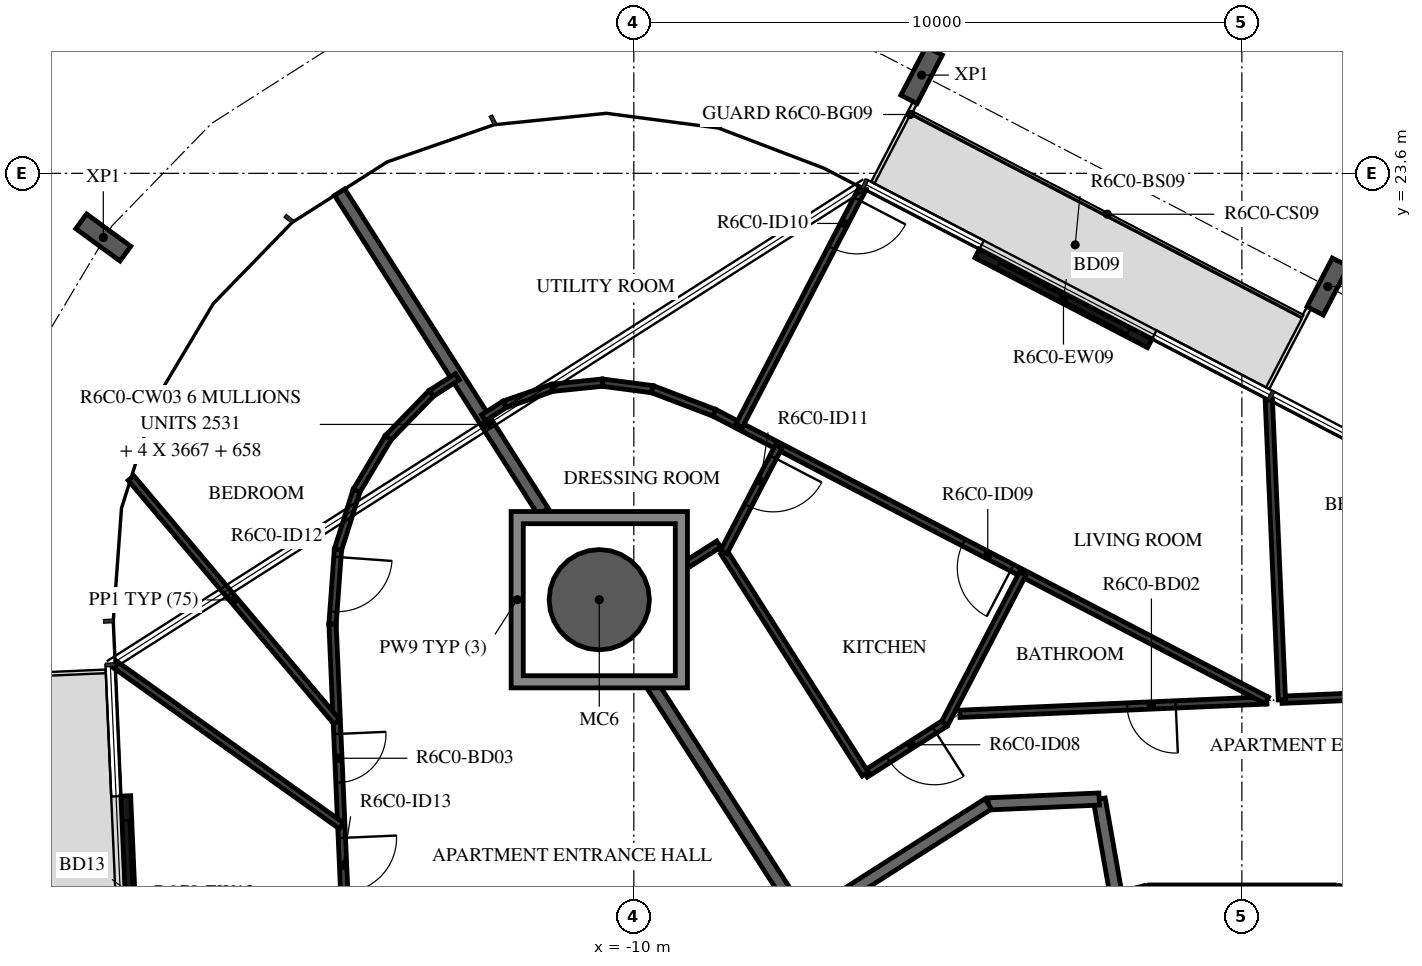
"""IFC4 building model, lengths in metres.
Left out: names, types, materials, properties, quantities, classifications, styles, units other than length and angle.
Written with IfcOpenShell. Run it as: python <this file> out.ifc"""

import sys

from ifc_helpers import new_model, si_unit, direction, frame, frame_2d, origin, origin_2d, place, context, subcontext, project, spatial, polyline, rectangle, hollow_circle, i_section, outline, extrude, element, fill, save


model = new_model("IFC4")
c1 = context("Model", 3, precision=1e-05, world=origin(), true_north=direction((0.0, 1.0)))
c2 = subcontext(c1, "Body", "Model", "MODEL_VIEW")
j1 = project(units=[si_unit("LENGTHUNIT", "METRE"), si_unit("PLANEANGLEUNIT", "RADIAN")], contexts=[c1])
p1 = place(None, origin())
s1 = spatial("IfcSite", under=j1, at=p1, CompositionType="ELEMENT")
p2 = place(p1, origin())
s2 = spatial("IfcBuilding", under=s1, at=p2, CompositionType="ELEMENT")
p3 = place(p2, frame((0.0, 0.0, 247.7)))
s3 = spatial("IfcBuildingStorey", under=s2, at=p3, CompositionType="ELEMENT", Elevation=247.7)
p4 = place(p3, frame((-10.568, 16.588, -0.38), z_axis=(0.0, 0.0, 1.0), x_axis=(1.0, 0.0, 0.0)))
e1 = element("IfcColumn", 1, at=p4, inside=s3, PredefinedType="COLUMN", context=c2, shape_type="SweptSolid", body=[
    extrude(hollow_circle(Radius=0.825, WallThickness=0.04, at=origin_2d()), origin(), (0.0, 0.0, 1.0), 3.5),
])
for number, where, z_axis, x_axis in (
    (2, (1.412, 21.739, -0.38), (0.0, 0.0, 1.0), (0.887, -0.462, 0.0)),
    (3, (-5.267, 25.216, -0.38), (0.0, 0.0, 1.0), (0.887, -0.462, 0.0)),
    (4, (-18.724, 22.545, -0.38), (0.0, 0.0, 1.0), (0.59, 0.808, 0.0)),
):
    element("IfcColumn", number, at=place(p3, frame(where, z_axis=z_axis, x_axis=x_axis)), inside=s3, PredefinedType="COLUMN", context=c2, shape_type="SweptSolid", body=[
        extrude(i_section(OverallWidth=0.3, OverallDepth=0.9, WebThickness=0.019, FlangeThickness=0.035, FilletRadius=0.03, at=origin_2d()), origin(), (0.0, 0.0, 1.0), 3.5),
    ])
p5 = place(p3, frame((-1.515, 20.804, 0.0), z_axis=(0.0, 0.0, 1.0), x_axis=(-0.887014349583, 0.461741858221, 0.0)))
e5 = element("IfcWall", 5, at=p5, inside=s3, PredefinedType="STANDARD", context=c2, shape_type="SweptSolid", body=[
    extrude(rectangle(XDim=3.2, YDim=0.16, at=frame_2d((1.6, 0.0))), origin(), (0.0, 0.0, 1.0), 3.12),
])
p6 = place(p5, frame((0.4, 0.0, 0.0)))
e6 = element("IfcOpeningElement", 6, at=p6, cuts=e5, PredefinedType="OPENING", context=c2, shape_type="SweptSolid", body=[
    extrude(rectangle(XDim=2.4, YDim=2.4, at=frame_2d((1.2, 1.2))), frame((0.0, 0.09, 0.0), z_axis=(0.0, -1.0, 0.0), x_axis=(1.0, 0.0, 0.0)), (0.0, 0.0, 1.0), 0.18),
])
p7 = place(p3, frame((-18.355, 13.362, 0.0), z_axis=(0.0, 0.0, 1.0), x_axis=(0.043639181999, -0.999047357133, 0.0)))
e7 = element("IfcWall", 7, at=p7, inside=s3, PredefinedType="STANDARD", context=c2, shape_type="SweptSolid", body=[
    extrude(rectangle(XDim=3.2, YDim=0.16, at=frame_2d((1.6, 0.0))), origin(), (0.0, 0.0, 1.0), 3.12),
])
p8 = place(p7, frame((0.4, 0.0, 0.0)))
e8 = element("IfcOpeningElement", 8, at=p8, cuts=e7, PredefinedType="OPENING", context=c2, shape_type="SweptSolid", body=[
    extrude(rectangle(XDim=2.4, YDim=2.4, at=frame_2d((1.2, 1.2))), frame((0.0, 0.09, 0.0), z_axis=(0.0, -1.0, 0.0), x_axis=(1.0, 0.0, 0.0)), (0.0, 0.0, 1.0), 0.18),
])
p9 = place(p3, frame((4.479, 10.858, 0.0), z_axis=(0.0, 0.0, 1.0), x_axis=(-0.965948410781, 0.258734743916, 0.0)))
e9 = element("IfcWall", 9, at=p9, inside=s3, PredefinedType="SHEAR", context=c2, shape_type="SweptSolid", body=[
    extrude(rectangle(XDim=3.033, YDim=0.5, at=frame_2d((1.516, 0.0))), origin(), (0.0, 0.0, 1.0), 3.12),
])
p10 = place(p9, frame((1.066, 0.0, 0.0)))
e10 = element("IfcOpeningElement", 10, at=p10, cuts=e9, PredefinedType="OPENING", context=c2, shape_type="SweptSolid", body=[
    extrude(rectangle(XDim=0.9, YDim=2.1, at=frame_2d((0.45, 1.05))), frame((0.0, 0.26, 0.0), z_axis=(0.0, -1.0, 0.0), x_axis=(1.0, 0.0, 0.0)), (0.0, 0.0, 1.0), 0.52),
])
for number, where, z_axis, x_axis in (
    (11, (1.516, 11.647, 0.0), (0.0, 0.0, 1.0), (-1.0, 0.0, 0.0)),
    (12, (-1.55, 11.643, 0.0), (0.0, 0.0, 1.0), (-0.966, -0.259, 0.0)),
):
    element("IfcWall", number, at=place(p3, frame(where, z_axis=z_axis, x_axis=x_axis)), inside=s3, PredefinedType="SHEAR", context=c2, shape_type="SweptSolid", body=[
        extrude(rectangle(XDim=3.033, YDim=0.5, at=frame_2d((1.516, 0.0))), origin(), (0.0, 0.0, 1.0), 3.12),
    ])
p11 = place(p3, frame((-2.074, 11.761, 0.0), z_axis=(0.0, 0.0, 1.0), x_axis=(-0.173679082312, 0.984802303189, 0.0)))
e13 = element("IfcWall", 13, at=p11, inside=s3, PredefinedType="STANDARD", context=c2, shape_type="SweptSolid", body=[
    extrude(rectangle(XDim=1.573, YDim=0.2, at=frame_2d((0.787, 0.0))), origin(), (0.0, 0.0, 1.0), 3.12),
])
p12 = place(p3, frame((-2.347, 13.31, 0.0), z_axis=(0.0, 0.0, 1.0), x_axis=(-0.999050095671, -0.043576442492, 0.0)))
e14 = element("IfcWall", 14, at=p12, inside=s3, PredefinedType="STANDARD", context=c2, shape_type="SweptSolid", body=[
    extrude(rectangle(XDim=1.826, YDim=0.2, at=frame_2d((0.913, 0.0))), origin(), (0.0, 0.0, 1.0), 3.12),
])
p13 = place(p3, frame((-4.172, 13.231, 0.0), z_axis=(0.0, 0.0, 1.0), x_axis=(-0.843388394728, -0.537304397561, 0.0)))
e15 = element("IfcWall", 15, at=p13, inside=s3, PredefinedType="STANDARD", context=c2, shape_type="SweptSolid", body=[
    extrude(rectangle(XDim=7.181, YDim=0.2, at=frame_2d((3.59, 0.0))), origin(), (0.0, 0.0, 1.0), 3.12),
])
p14 = place(p3, frame((-9.69, 15.171, 0.0), z_axis=(0.0, 0.0, 1.0), x_axis=(0.540961372678, -0.841047438181, 0.0)))
e16 = element("IfcWall", 16, at=p14, inside=s3, PredefinedType="STANDARD", context=c2, shape_type="SweptSolid", body=[
    extrude(rectangle(XDim=4.602, YDim=0.2, at=frame_2d((2.301, 0.0))), origin(), (0.0, 0.0, 1.0), 3.12),
])
p15 = place(p3, frame((-14.837, 23.29, 0.0), z_axis=(0.0, 0.0, 1.0), x_axis=(0.537316863221, -0.843380452998, 0.0)))
e17 = element("IfcWall", 17, at=p15, inside=s3, PredefinedType="STANDARD", context=c2, shape_type="SweptSolid", body=[
    extrude(rectangle(XDim=6.227, YDim=0.2, at=frame_2d((3.113, 0.0))), origin(), (0.0, 0.0, 1.0), 3.12),
])
p16 = place(p3, frame((3.339, 15.06, 0.0), z_axis=(0.0, 0.0, 1.0), x_axis=(-0.999045829762, -0.043674134634, 0.0)))
e18 = element("IfcWall", 18, at=p16, inside=s3, PredefinedType="PARTITIONING", context=c2, shape_type="SweptSolid", body=[
    extrude(rectangle(XDim=2.683, YDim=0.12, at=frame_2d((1.342, 0.0))), origin(), (0.0, 0.0, 1.0), 3.12),
])
p17 = place(p3, frame((0.41, 14.932, 0.0), z_axis=(0.0, 0.0, 1.0), x_axis=(-0.99904802852, -0.043623808982, 0.0)))
e19 = element("IfcWall", 19, at=p17, inside=s3, PredefinedType="PARTITIONING", context=c2, shape_type="SweptSolid", body=[
    extrude(rectangle(XDim=5.054, YDim=0.12, at=frame_2d((2.527, 0.0))), origin(), (0.0, 0.0, 1.0), 3.12),
])
p18 = place(p17, frame((1.5, 0.0, 0.0)))
e20 = element("IfcOpeningElement", 20, at=p18, cuts=e19, PredefinedType="OPENING", context=c2, shape_type="SweptSolid", body=[
    extrude(rectangle(XDim=0.8, YDim=2.1, at=frame_2d((0.4, 1.05))), frame((0.0, 0.07, 0.0), z_axis=(0.0, -1.0, 0.0), x_axis=(1.0, 0.0, 0.0)), (0.0, 0.0, 1.0), 0.14),
])
p19 = place(p3, frame((-4.888, 14.553, 0.0), z_axis=(0.0, 0.0, 1.0), x_axis=(-0.843349608892, -0.537365273517, 0.0)))
e21 = element("IfcWall", 21, at=p19, inside=s3, PredefinedType="PARTITIONING", context=c2, shape_type="SweptSolid", body=[
    extrude(rectangle(XDim=1.548, YDim=0.12, at=frame_2d((0.774, 0.0))), origin(), (0.0, 0.0, 1.0), 3.12),
])
p20 = place(p19, frame((0.2, 0.0, 0.0)))
e22 = element("IfcOpeningElement", 22, at=p20, cuts=e21, PredefinedType="OPENING", context=c2, shape_type="SweptSolid", body=[
    extrude(rectangle(XDim=0.9, YDim=2.1, at=frame_2d((0.45, 1.05))), frame((0.0, 0.07, 0.0), z_axis=(0.0, -1.0, 0.0), x_axis=(1.0, 0.0, 0.0)), (0.0, 0.0, 1.0), 0.14),
])
p21 = place(p3, frame((-6.194, 13.721, 0.0), z_axis=(0.0, 0.0, 1.0), x_axis=(-0.537316807294, 0.843380488629, 0.0)))
e23 = element("IfcWall", 23, at=p21, inside=s3, PredefinedType="PARTITIONING", context=c2, shape_type="SweptSolid", body=[
    extrude(rectangle(XDim=4.331, YDim=0.12, at=frame_2d((2.165, 0.0))), origin(), (0.0, 0.0, 1.0), 3.12),
])
p22 = place(p3, frame((-8.604, 17.504, 0.0), z_axis=(0.0, 0.0, 1.0), x_axis=(-0.843265746233, -0.537496866251, 0.0)))
e24 = element("IfcWall", 24, at=p22, inside=s3, PredefinedType="PARTITIONING", context=c2, shape_type="SweptSolid", body=[
    extrude(rectangle(XDim=0.61, YDim=0.12, at=frame_2d((0.305, 0.0))), origin(), (0.0, 0.0, 1.0), 3.12),
])
p23 = place(p3, frame((0.442, 19.876, 0.0), z_axis=(0.0, 0.0, 1.0), x_axis=(0.04366038102, -0.999046430918, 0.0)))
e25 = element("IfcWall", 25, at=p23, inside=s3, PredefinedType="PARTITIONING", context=c2, shape_type="SweptSolid", body=[
    extrude(rectangle(XDim=4.938, YDim=0.12, at=frame_2d((2.469, 0.0))), origin(), (0.0, 0.0, 1.0), 3.12),
])
p24 = place(p3, frame((0.41, 14.932, 0.0), z_axis=(0.0, 0.0, 1.0), x_axis=(-0.887012293034, 0.461745808867, 0.0)))
e26 = element("IfcWall", 26, at=p24, inside=s3, PredefinedType="PARTITIONING", context=c2, shape_type="SweptSolid", body=[
    extrude(rectangle(XDim=10.246, YDim=0.12, at=frame_2d((5.123, 0.0))), origin(), (0.0, 0.0, 1.0), 3.12),
])
p25 = place(p24, frame((4.725, 0.0, 0.0)))
e27 = element("IfcOpeningElement", 27, at=p25, cuts=e26, PredefinedType="OPENING", context=c2, shape_type="SweptSolid", body=[
    extrude(rectangle(XDim=0.9, YDim=2.1, at=frame_2d((0.45, 1.05))), frame((0.0, 0.07, 0.0), z_axis=(0.0, -1.0, 0.0), x_axis=(1.0, 0.0, 0.0)), (0.0, 0.0, 1.0), 0.14),
])
p26 = place(p3, frame((-3.603, 17.021, 0.0), z_axis=(0.0, 0.0, 1.0), x_axis=(-0.46178633653, -0.886991194654, 0.0)))
e28 = element("IfcWall", 28, at=p26, inside=s3, PredefinedType="PARTITIONING", context=c2, shape_type="SweptSolid", body=[
    extrude(rectangle(XDim=2.783, YDim=0.12, at=frame_2d((1.392, 0.0))), origin(), (0.0, 0.0, 1.0), 3.12),
])
p27 = place(p3, frame((-6.237, 23.353, 0.0), z_axis=(0.0, 0.0, 1.0), x_axis=(-0.461714347673, -0.88702866986, 0.0)))
e29 = element("IfcWall", 29, at=p27, inside=s3, PredefinedType="PARTITIONING", context=c2, shape_type="SweptSolid", body=[
    extrude(rectangle(XDim=4.4, YDim=0.12, at=frame_2d((2.2, 0.0))), origin(), (0.0, 0.0, 1.0), 2.73),
])
p28 = place(p27, frame((0.2, 0.0, 0.0)))
e30 = element("IfcOpeningElement", 30, at=p28, cuts=e29, PredefinedType="OPENING", context=c2, shape_type="SweptSolid", body=[
    extrude(rectangle(XDim=0.9, YDim=2.1, at=frame_2d((0.45, 1.05))), frame((0.0, 0.07, 0.0), z_axis=(0.0, -1.0, 0.0), x_axis=(1.0, 0.0, 0.0)), (0.0, 0.0, 1.0), 0.14),
])
p29 = place(p3, frame((-7.616, 19.11, 0.0), z_axis=(0.0, 0.0, 1.0), x_axis=(-0.461764840073, -0.887002385832, 0.0)))
e31 = element("IfcWall", 31, at=p29, inside=s3, PredefinedType="PARTITIONING", context=c2, shape_type="SweptSolid", body=[
    extrude(rectangle(XDim=1.958, YDim=0.12, at=frame_2d((0.979, 0.0))), origin(), (0.0, 0.0, 1.0), 3.12),
])
p30 = place(p29, frame((0.2, 0.0, 0.0)))
e32 = element("IfcOpeningElement", 32, at=p30, cuts=e31, PredefinedType="OPENING", context=c2, shape_type="SweptSolid", body=[
    extrude(rectangle(XDim=0.9, YDim=2.1, at=frame_2d((0.45, 1.05))), frame((0.0, 0.07, 0.0), z_axis=(0.0, -1.0, 0.0), x_axis=(1.0, 0.0, 0.0)), (0.0, 0.0, 1.0), 0.14),
])
p31 = place(p3, frame((-12.473, 19.579, 0.0), z_axis=(0.0, 0.0, 1.0), x_axis=(0.843467404643, 0.537180358264, 0.0)))
e33 = element("IfcWall", 33, at=p31, inside=s3, PredefinedType="PARTITIONING", context=c2, shape_type="SweptSolid", body=[
    extrude(rectangle(XDim=0.415, YDim=0.12, at=frame_2d((0.207, 0.0))), origin(), (0.0, 0.0, 1.0), 3.12),
])
for number, where, z_axis, x_axis in (
    (34, (-12.124, 19.802, 0.0), (0.0, 0.0, 1.0), (0.945, 0.328, 0.0)),
    (35, (-11.341, 20.074, 0.0), (0.0, 0.0, 1.0), (0.995, 0.102, 0.0)),
    (36, (-10.516, 20.158, 0.0), (0.0, 0.0, 1.0), (0.991, -0.131, 0.0)),
):
    element("IfcWall", number, at=place(p3, frame(where, z_axis=z_axis, x_axis=x_axis)), inside=s3, PredefinedType="PARTITIONING", context=c2, shape_type="SweptSolid", body=[
        extrude(rectangle(XDim=0.829, YDim=0.12, at=frame_2d((0.415, 0.0))), origin(), (0.0, 0.0, 1.0), 3.12),
    ])
p32 = place(p3, frame((-9.694, 20.05, 0.0), z_axis=(0.0, 0.0, 1.0), x_axis=(0.934647766222, -0.35557496129, 0.0)))
e37 = element("IfcWall", 37, at=p32, inside=s3, PredefinedType="PARTITIONING", context=c2, shape_type="SweptSolid", body=[
    extrude(rectangle(XDim=1.087, YDim=0.12, at=frame_2d((0.543, 0.0))), origin(), (0.0, 0.0, 1.0), 3.12),
])
p33 = place(p3, frame((-12.903, 20.254, 0.0), z_axis=(0.0, 0.0, 1.0), x_axis=(-0.843404143432, -0.537279676557, 0.0)))
e38 = element("IfcWall", 38, at=p33, inside=s3, PredefinedType="PARTITIONING", context=c2, shape_type="SweptSolid", body=[
    extrude(rectangle(XDim=0.508, YDim=0.12, at=frame_2d((0.254, 0.0))), origin(), (0.0, 0.0, 1.0), 3.12),
])
for number, where, z_axis, x_axis in (
    (39, (-13.332, 19.981, 0.0), (0.0, 0.0, 1.0), (-0.697, -0.717, 0.0)),
    (40, (-14.039, 19.252, 0.0), (0.0, 0.0, 1.0), (-0.513, -0.859, 0.0)),
    (41, (-14.56, 18.38, 0.0), (0.0, 0.0, 1.0), (-0.301, -0.954, 0.0)),
):
    element("IfcWall", number, at=place(p3, frame(where, z_axis=z_axis, x_axis=x_axis)), inside=s3, PredefinedType="PARTITIONING", context=c2, shape_type="SweptSolid", body=[
        extrude(rectangle(XDim=1.016, YDim=0.12, at=frame_2d((0.508, 0.0))), origin(), (0.0, 0.0, 1.0), 3.12),
    ])
p34 = place(p3, frame((-14.865, 17.411, 0.0), z_axis=(0.0, 0.0, 1.0), x_axis=(-0.072618457011, -0.997359794508, 0.0)))
e42 = element("IfcWall", 42, at=p34, inside=s3, PredefinedType="PARTITIONING", context=c2, shape_type="SweptSolid", body=[
    extrude(rectangle(XDim=1.227, YDim=0.12, at=frame_2d((0.614, 0.0))), origin(), (0.0, 0.0, 1.0), 3.12),
])
p35 = place(p34, frame((0.12, 0.0, 0.0)))
e43 = element("IfcOpeningElement", 43, at=p35, cuts=e42, PredefinedType="OPENING", context=c2, shape_type="SweptSolid", body=[
    extrude(rectangle(XDim=0.9, YDim=2.1, at=frame_2d((0.45, 1.05))), frame((0.0, 0.07, 0.0), z_axis=(0.0, -1.0, 0.0), x_axis=(1.0, 0.0, 0.0)), (0.0, 0.0, 1.0), 0.14),
])
p36 = place(p3, frame((-14.955, 16.187, 0.0), z_axis=(0.0, 0.0, 1.0), x_axis=(0.04360777668, -0.999048728448, 0.0)))
e44 = element("IfcWall", 44, at=p36, inside=s3, PredefinedType="PARTITIONING", context=c2, shape_type="SweptSolid", body=[
    extrude(rectangle(XDim=11.679, YDim=0.12, at=frame_2d((5.839, 0.0))), origin(), (0.0, 0.0, 1.0), 3.12),
])
p37 = place(p36, frame((1.808, 0.0, 0.0)))
e45 = element("IfcOpeningElement", 45, at=p37, cuts=e44, PredefinedType="OPENING", context=c2, shape_type="SweptSolid", body=[
    extrude(rectangle(XDim=0.8, YDim=2.1, at=frame_2d((0.4, 1.05))), frame((0.0, 0.07, 0.0), z_axis=(0.0, -1.0, 0.0), x_axis=(1.0, 0.0, 0.0)), (0.0, 0.0, 1.0), 0.14),
])
p38 = place(p36, frame((3.519, 0.0, 0.0)))
e46 = element("IfcOpeningElement", 46, at=p38, cuts=e44, PredefinedType="OPENING", context=c2, shape_type="SweptSolid", body=[
    extrude(rectangle(XDim=0.9, YDim=2.1, at=frame_2d((0.45, 1.05))), frame((0.0, 0.07, 0.0), z_axis=(0.0, -1.0, 0.0), x_axis=(1.0, 0.0, 0.0)), (0.0, 0.0, 1.0), 0.14),
])
p39 = place(p3, frame((-18.269, 18.589, 0.0), z_axis=(0.0, 0.0, 1.0), x_axis=(0.645124067673, -0.764077834588, 0.0)))
e47 = element("IfcWall", 47, at=p39, inside=s3, PredefinedType="PARTITIONING", context=c2, shape_type="SweptSolid", body=[
    extrude(rectangle(XDim=5.246, YDim=0.12, at=frame_2d((2.623, 0.0))), origin(), (0.0, 0.0, 1.0), 3.12),
])
p40 = place(p3, frame((-18.529, 15.522, 0.0), z_axis=(0.0, 0.0, 1.0), x_axis=(0.814350646776, -0.580373176582, 0.0)))
e48 = element("IfcWall", 48, at=p40, inside=s3, PredefinedType="PARTITIONING", context=c2, shape_type="SweptSolid", body=[
    extrude(rectangle(XDim=4.567, YDim=0.12, at=frame_2d((2.284, 0.0))), origin(), (0.0, 0.0, 1.0), 3.12),
])
p41 = place(p3, origin())
e49 = element("IfcWall", 49, at=p41, inside=s3, PredefinedType="STANDARD", context=c2, shape_type="SweptSolid", body=[
    extrude(outline(polyline([(-9.118, 18.038), (-9.118, 15.138), (-12.018, 15.138), (-12.018, 18.038), (-9.118, 18.038)]), holes=[polyline([(-11.818, 15.338), (-9.318, 15.338), (-9.318, 17.838), (-11.818, 17.838), (-11.818, 15.338)])]), origin(), (0.0, 0.0, 1.0), 3.12),
])
p42 = place(p6, origin())
e50 = element("IfcDoor", 50, at=p42, inside=s3, OperationType="DOUBLE_DOOR_SLIDING", PredefinedType="DOOR", context=c2, shape_type="SweptSolid", body=[
    extrude(rectangle(XDim=2.4, YDim=2.4, at=frame_2d((1.2, 1.2))), frame((0.0, 0.025, 0.0), z_axis=(0.0, -1.0, 0.0), x_axis=(1.0, 0.0, 0.0)), (0.0, 0.0, 1.0), 0.05),
])
fill(e6, e50)
p43 = place(p8, origin())
e51 = element("IfcDoor", 51, at=p43, inside=s3, OperationType="DOUBLE_DOOR_SLIDING", PredefinedType="DOOR", context=c2, shape_type="SweptSolid", body=[
    extrude(rectangle(XDim=2.4, YDim=2.4, at=frame_2d((1.2, 1.2))), frame((0.0, 0.025, 0.0), z_axis=(0.0, -1.0, 0.0), x_axis=(1.0, 0.0, 0.0)), (0.0, 0.0, 1.0), 0.05),
])
fill(e8, e51)
p44 = place(p18, origin())
e52 = element("IfcDoor", 52, at=p44, inside=s3, OperationType="SINGLE_SWING_RIGHT", PredefinedType="DOOR", context=c2, shape_type="SweptSolid", body=[
    extrude(rectangle(XDim=0.8, YDim=2.1, at=frame_2d((0.4, 1.05))), frame((0.0, 0.025, 0.0), z_axis=(0.0, -1.0, 0.0), x_axis=(1.0, 0.0, 0.0)), (0.0, 0.0, 1.0), 0.05),
])
fill(e20, e52)
p45 = place(p20, origin())
e53 = element("IfcDoor", 53, at=p45, inside=s3, OperationType="SINGLE_SWING_RIGHT", PredefinedType="DOOR", context=c2, shape_type="SweptSolid", body=[
    extrude(rectangle(XDim=0.9, YDim=2.1, at=frame_2d((0.45, 1.05))), frame((0.0, 0.025, 0.0), z_axis=(0.0, -1.0, 0.0), x_axis=(1.0, 0.0, 0.0)), (0.0, 0.0, 1.0), 0.05),
])
fill(e22, e53)
p46 = place(p25, origin())
e54 = element("IfcDoor", 54, at=p46, inside=s3, OperationType="SINGLE_SWING_RIGHT", PredefinedType="DOOR", context=c2, shape_type="SweptSolid", body=[
    extrude(rectangle(XDim=0.9, YDim=2.1, at=frame_2d((0.45, 1.05))), frame((0.0, 0.025, 0.0), z_axis=(0.0, -1.0, 0.0), x_axis=(1.0, 0.0, 0.0)), (0.0, 0.0, 1.0), 0.05),
])
fill(e27, e54)
p47 = place(p28, origin())
e55 = element("IfcDoor", 55, at=p47, inside=s3, OperationType="SINGLE_SWING_RIGHT", PredefinedType="DOOR", context=c2, shape_type="SweptSolid", body=[
    extrude(rectangle(XDim=0.9, YDim=2.1, at=frame_2d((0.45, 1.05))), frame((0.0, 0.025, 0.0), z_axis=(0.0, -1.0, 0.0), x_axis=(1.0, 0.0, 0.0)), (0.0, 0.0, 1.0), 0.05),
])
fill(e30, e55)
p48 = place(p30, origin())
e56 = element("IfcDoor", 56, at=p48, inside=s3, OperationType="SINGLE_SWING_RIGHT", PredefinedType="DOOR", context=c2, shape_type="SweptSolid", body=[
    extrude(rectangle(XDim=0.9, YDim=2.1, at=frame_2d((0.45, 1.05))), frame((0.0, 0.025, 0.0), z_axis=(0.0, -1.0, 0.0), x_axis=(1.0, 0.0, 0.0)), (0.0, 0.0, 1.0), 0.05),
])
fill(e32, e56)
p49 = place(p35, origin())
e57 = element("IfcDoor", 57, at=p49, inside=s3, OperationType="SINGLE_SWING_LEFT", PredefinedType="DOOR", context=c2, shape_type="SweptSolid", body=[
    extrude(rectangle(XDim=0.9, YDim=2.1, at=frame_2d((0.45, 1.05))), frame((0.0, 0.025, 0.0), z_axis=(0.0, -1.0, 0.0), x_axis=(1.0, 0.0, 0.0)), (0.0, 0.0, 1.0), 0.05),
])
fill(e43, e57)
p50 = place(p37, origin())
e58 = element("IfcDoor", 58, at=p50, inside=s3, OperationType="SINGLE_SWING_LEFT", PredefinedType="DOOR", context=c2, shape_type="SweptSolid", body=[
    extrude(rectangle(XDim=0.8, YDim=2.1, at=frame_2d((0.4, 1.05))), frame((0.0, 0.025, 0.0), z_axis=(0.0, -1.0, 0.0), x_axis=(1.0, 0.0, 0.0)), (0.0, 0.0, 1.0), 0.05),
])
fill(e45, e58)
p51 = place(p38, origin())
e59 = element("IfcDoor", 59, at=p51, inside=s3, OperationType="SINGLE_SWING_LEFT", PredefinedType="DOOR", context=c2, shape_type="SweptSolid", body=[
    extrude(rectangle(XDim=0.9, YDim=2.1, at=frame_2d((0.45, 1.05))), frame((0.0, 0.025, 0.0), z_axis=(0.0, -1.0, 0.0), x_axis=(1.0, 0.0, 0.0)), (0.0, 0.0, 1.0), 0.05),
])
fill(e46, e59)
save(model, sys.argv[1])
